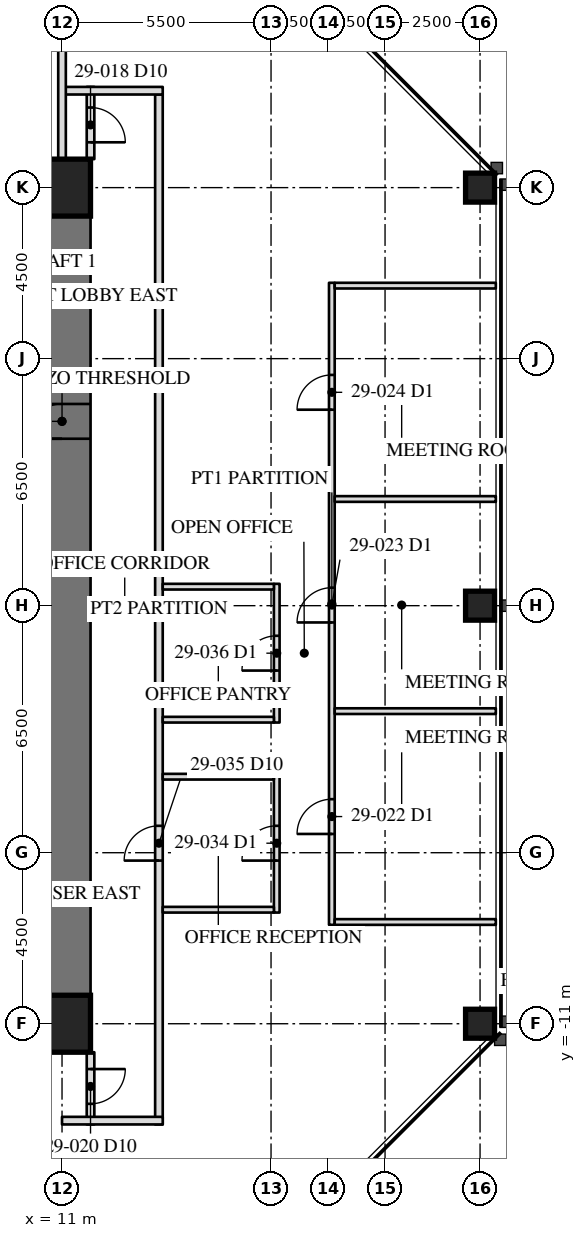
"""IFC4 building model, lengths in metres.
Left out: names, types, materials, properties, quantities, classifications, styles, units other than length and angle.
Written with IfcOpenShell. Run it as: python <this file> out.ifc"""

import sys

from ifc_helpers import new_model, si_unit, direction, frame, frame_2d, origin, origin_2d, place, context, subcontext, project, spatial, rectangle, hollow_rectangle, extrude, element, fill, save


model = new_model("IFC4")
c1 = context("Model", 3, precision=1e-05, world=origin(), true_north=direction((0.0, 1.0)))
c2 = subcontext(c1, "Body", "Model", "MODEL_VIEW")
j1 = project(units=[si_unit("LENGTHUNIT", "METRE"), si_unit("PLANEANGLEUNIT", "RADIAN")], contexts=[c1])
p1 = place(None, origin())
s1 = spatial("IfcSite", under=j1, at=p1, CompositionType="ELEMENT")
p2 = place(p1, origin())
s2 = spatial("IfcBuilding", under=s1, at=p2, CompositionType="ELEMENT")
p3 = place(p2, frame((0.0, 0.0, 125.4)))
s3 = spatial("IfcBuildingStorey", under=s2, at=p3, CompositionType="ELEMENT", Elevation=125.4)
for number, where, z_axis, x_axis in (
    (1, (22.0, -11.0, 0.0), (0.0, 0.0, 1.0), (0.0, 1.0, 0.0)),
    (2, (22.0, 0.0, 0.0), (0.0, 0.0, 1.0), (0.0, 1.0, 0.0)),
    (3, (22.0, 11.0, 0.0), (0.0, 0.0, 1.0), (0.0, 1.0, 0.0)),
):
    element("IfcColumn", number, at=place(p3, frame(where, z_axis=z_axis, x_axis=x_axis)), inside=s3, PredefinedType="COLUMN", context=c2, shape_type="SweptSolid", body=[
        extrude(hollow_rectangle(XDim=0.762, YDim=0.762, WallThickness=0.076, at=origin_2d()), origin(), (0.0, 0.0, 1.0), 4.1),
    ])
p4 = place(p3, frame((11.0, -11.0, 0.0), z_axis=(0.0, 0.0, 1.0), x_axis=(0.0, 1.0, 0.0)))
e4 = element("IfcWall", 4, at=p4, inside=s3, PredefinedType="SHEAR", context=c2, shape_type="SweptSolid", body=[
    extrude(rectangle(XDim=22.0, YDim=1.5, at=frame_2d((11.0, 0.0))), origin(), (0.0, 0.0, 1.0), 4.1),
])
p5 = place(p4, frame((15.393, 0.0, 0.0)))
e5 = element("IfcOpeningElement", 5, at=p5, cuts=e4, PredefinedType="OPENING", context=c2, shape_type="SweptSolid", body=[
    extrude(rectangle(XDim=0.915, YDim=2.134, at=frame_2d((0.458, 1.067))), frame((0.0, 0.76, 0.0), z_axis=(0.0, -1.0, 0.0), x_axis=(1.0, 0.0, 0.0)), (0.0, 0.0, 1.0), 1.52),
])
for number, where, z_axis, x_axis in (
    (6, (11.0, 11.0, 0.0), (0.0, 0.0, 1.0), (-1.0, 0.0, 0.0)),
    (7, (6.5, -11.0, 0.0), (0.0, 0.0, 1.0), (1.0, 0.0, 0.0)),
):
    element("IfcWall", number, at=place(p3, frame(where, z_axis=z_axis, x_axis=x_axis)), inside=s3, PredefinedType="SHEAR", context=c2, shape_type="SweptSolid", body=[
        extrude(rectangle(XDim=4.5, YDim=1.5, at=frame_2d((2.25, 0.0))), origin(), (0.0, 0.0, 1.0), 4.1),
    ])
for number, where, z_axis, x_axis in (
    (8, (11.0, 11.0, 0.0), (0.0, 0.0, 1.0), (1.0, 0.0, 0.0)),
    (9, (11.0, -11.0, 0.0), (0.0, 0.0, 1.0), (1.0, 0.0, 0.0)),
):
    element("IfcColumn", number, at=place(p3, frame(where, z_axis=z_axis, x_axis=x_axis)), inside=s3, PredefinedType="COLUMN", context=c2, shape_type="SweptSolid", body=[
        extrude(hollow_rectangle(XDim=1.499, YDim=1.499, WallThickness=0.102, at=origin_2d()), origin(), (0.0, 0.0, 1.0), 4.1),
    ])
p6 = place(p3, frame((13.55, -13.65, 0.0), z_axis=(0.0, 0.0, 1.0), x_axis=(0.0, 1.0, 0.0)))
e10 = element("IfcWall", 10, at=p6, inside=s3, PredefinedType="PARTITIONING", context=c2, shape_type="SweptSolid", body=[
    extrude(rectangle(XDim=27.1, YDim=0.2, at=frame_2d((13.55, 0.0))), origin(), (0.0, 0.0, 1.0), 3.91),
])
p7 = place(p6, frame((6.942, 0.0, 0.0)))
e11 = element("IfcOpeningElement", 11, at=p7, cuts=e10, PredefinedType="OPENING", context=c2, shape_type="SweptSolid", body=[
    extrude(rectangle(XDim=0.915, YDim=2.134, at=frame_2d((0.458, 1.067))), frame((0.0, 0.11, 0.0), z_axis=(0.0, -1.0, 0.0), x_axis=(1.0, 0.0, 0.0)), (0.0, 0.0, 1.0), 0.22),
])
p8 = place(p3, frame((11.75, 11.75, 0.0), z_axis=(0.0, 0.0, 1.0), x_axis=(0.0, 1.0, 0.0)))
e12 = element("IfcWall", 12, at=p8, inside=s3, PredefinedType="PARTITIONING", context=c2, shape_type="SweptSolid", body=[
    extrude(rectangle(XDim=1.9, YDim=0.2, at=frame_2d((0.95, 0.0))), origin(), (0.0, 0.0, 1.0), 3.91),
])
p9 = place(p8, frame((0.442, 0.0, 0.0)))
e13 = element("IfcOpeningElement", 13, at=p9, cuts=e12, PredefinedType="OPENING", context=c2, shape_type="SweptSolid", body=[
    extrude(rectangle(XDim=0.915, YDim=2.134, at=frame_2d((0.458, 1.067))), frame((0.0, 0.11, 0.0), z_axis=(0.0, -1.0, 0.0), x_axis=(1.0, 0.0, 0.0)), (0.0, 0.0, 1.0), 0.22),
])
p10 = place(p3, frame((11.0, 13.55, 0.0), z_axis=(0.0, 0.0, 1.0), x_axis=(1.0, 0.0, 0.0)))
e14 = element("IfcWall", 14, at=p10, inside=s3, PredefinedType="PARTITIONING", context=c2, shape_type="SweptSolid", body=[
    extrude(rectangle(XDim=2.65, YDim=0.2, at=frame_2d((1.325, 0.0))), origin(), (0.0, 0.0, 1.0), 3.91),
])
p11 = place(p3, frame((11.75, -11.75, 0.0), z_axis=(0.0, 0.0, 1.0), x_axis=(0.0, -1.0, 0.0)))
e15 = element("IfcWall", 15, at=p11, inside=s3, PredefinedType="PARTITIONING", context=c2, shape_type="SweptSolid", body=[
    extrude(rectangle(XDim=1.9, YDim=0.2, at=frame_2d((0.95, 0.0))), origin(), (0.0, 0.0, 1.0), 3.91),
])
p12 = place(p11, frame((0.442, 0.0, 0.0)))
e16 = element("IfcOpeningElement", 16, at=p12, cuts=e15, PredefinedType="OPENING", context=c2, shape_type="SweptSolid", body=[
    extrude(rectangle(XDim=0.915, YDim=2.134, at=frame_2d((0.458, 1.067))), frame((0.0, 0.11, 0.0), z_axis=(0.0, -1.0, 0.0), x_axis=(1.0, 0.0, 0.0)), (0.0, 0.0, 1.0), 0.22),
])
p13 = place(p3, frame((11.0, -13.55, 0.0), z_axis=(0.0, 0.0, 1.0), x_axis=(1.0, 0.0, 0.0)))
e17 = element("IfcWall", 17, at=p13, inside=s3, PredefinedType="PARTITIONING", context=c2, shape_type="SweptSolid", body=[
    extrude(rectangle(XDim=2.65, YDim=0.2, at=frame_2d((1.325, 0.0))), origin(), (0.0, 0.0, 1.0), 3.91),
])
p14 = place(p3, frame((11.0, 11.75, 0.0), z_axis=(0.0, 0.0, 1.0), x_axis=(0.0, 1.0, 0.0)))
e18 = element("IfcWall", 18, at=p14, inside=s3, PredefinedType="PARTITIONING", context=c2, shape_type="SweptSolid", body=[
    extrude(rectangle(XDim=10.665, YDim=0.2, at=frame_2d((5.333, 0.0))), origin(), (0.0, 0.0, 1.0), 3.326),
])
p15 = place(p3, frame((18.1, -8.398, 0.0), z_axis=(0.0, 0.0, 1.0), x_axis=(0.0, 1.0, 0.0)))
e19 = element("IfcWall", 19, at=p15, inside=s3, PredefinedType="PARTITIONING", context=c2, shape_type="SweptSolid", body=[
    extrude(rectangle(XDim=16.894, YDim=0.15, at=frame_2d((8.447, 0.0))), origin(), (0.0, 0.0, 1.0), 3.91),
])
p16 = place(p15, frame((2.392, 0.0, 0.0)))
e20 = element("IfcOpeningElement", 20, at=p16, cuts=e19, PredefinedType="OPENING", context=c2, shape_type="SweptSolid", body=[
    extrude(rectangle(XDim=0.915, YDim=2.134, at=frame_2d((0.458, 1.067))), frame((0.0, 0.085, 0.0), z_axis=(0.0, -1.0, 0.0), x_axis=(1.0, 0.0, 0.0)), (0.0, 0.0, 1.0), 0.17),
])
p17 = place(p15, frame((7.957, 0.0, 0.0)))
e21 = element("IfcOpeningElement", 21, at=p17, cuts=e19, PredefinedType="OPENING", context=c2, shape_type="SweptSolid", body=[
    extrude(rectangle(XDim=0.915, YDim=2.134, at=frame_2d((0.458, 1.067))), frame((0.0, 0.085, 0.0), z_axis=(0.0, -1.0, 0.0), x_axis=(1.0, 0.0, 0.0)), (0.0, 0.0, 1.0), 0.17),
])
p18 = place(p15, frame((13.554, 0.0, 0.0)))
e22 = element("IfcOpeningElement", 22, at=p18, cuts=e19, PredefinedType="OPENING", context=c2, shape_type="SweptSolid", body=[
    extrude(rectangle(XDim=0.915, YDim=2.134, at=frame_2d((0.458, 1.067))), frame((0.0, 0.085, 0.0), z_axis=(0.0, -1.0, 0.0), x_axis=(1.0, 0.0, 0.0)), (0.0, 0.0, 1.0), 0.17),
])
for number, where, z_axis, x_axis in (
    (23, (18.175, -8.323, 0.0), (0.0, 0.0, 1.0), (1.0, 0.0, 0.0)),
    (24, (18.175, -2.775, 0.0), (0.0, 0.0, 1.0), (1.0, 0.0, 0.0)),
    (25, (18.175, 2.807, 0.0), (0.0, 0.0, 1.0), (1.0, 0.0, 0.0)),
    (26, (18.175, 8.421, 0.0), (0.0, 0.0, 1.0), (1.0, 0.0, 0.0)),
):
    element("IfcWall", number, at=place(p3, frame(where, z_axis=z_axis, x_axis=x_axis)), inside=s3, PredefinedType="PARTITIONING", context=c2, shape_type="SweptSolid", body=[
        extrude(rectangle(XDim=4.24, YDim=0.15, at=frame_2d((2.12, 0.0))), origin(), (0.0, 0.0, 1.0), 3.91),
    ])
p19 = place(p3, frame((16.65, -8.075, 0.0), z_axis=(0.0, 0.0, 1.0), x_axis=(0.0, 1.0, 0.0)))
e27 = element("IfcWall", 27, at=p19, inside=s3, PredefinedType="PARTITIONING", context=c2, shape_type="SweptSolid", body=[
    extrude(rectangle(XDim=3.65, YDim=0.15, at=frame_2d((1.825, 0.0))), origin(), (0.0, 0.0, 1.0), 3.91),
])
p20 = place(p19, frame((1.367, 0.0, 0.0)))
e28 = element("IfcOpeningElement", 28, at=p20, cuts=e27, PredefinedType="OPENING", context=c2, shape_type="SweptSolid", body=[
    extrude(rectangle(XDim=0.915, YDim=2.134, at=frame_2d((0.458, 1.067))), frame((0.0, 0.085, 0.0), z_axis=(0.0, -1.0, 0.0), x_axis=(1.0, 0.0, 0.0)), (0.0, 0.0, 1.0), 0.17),
])
for number, where, z_axis, x_axis in (
    (29, (16.575, -8.0, 0.0), (0.0, 0.0, 1.0), (-1.0, 0.0, 0.0)),
    (30, (16.575, -4.5, 0.0), (0.0, 0.0, 1.0), (-1.0, 0.0, 0.0)),
):
    element("IfcWall", number, at=place(p3, frame(where, z_axis=z_axis, x_axis=x_axis)), inside=s3, PredefinedType="PARTITIONING", context=c2, shape_type="SweptSolid", body=[
        extrude(rectangle(XDim=2.925, YDim=0.15, at=frame_2d((1.462, 0.0))), origin(), (0.0, 0.0, 1.0), 3.91),
    ])
p21 = place(p3, frame((16.65, -3.075, 0.0), z_axis=(0.0, 0.0, 1.0), x_axis=(0.0, 1.0, 0.0)))
e31 = element("IfcWall", 31, at=p21, inside=s3, PredefinedType="PARTITIONING", context=c2, shape_type="SweptSolid", body=[
    extrude(rectangle(XDim=3.65, YDim=0.15, at=frame_2d((1.825, 0.0))), origin(), (0.0, 0.0, 1.0), 3.91),
])
p22 = place(p21, frame((1.367, 0.0, 0.0)))
e32 = element("IfcOpeningElement", 32, at=p22, cuts=e31, PredefinedType="OPENING", context=c2, shape_type="SweptSolid", body=[
    extrude(rectangle(XDim=0.915, YDim=2.134, at=frame_2d((0.458, 1.067))), frame((0.0, 0.085, 0.0), z_axis=(0.0, -1.0, 0.0), x_axis=(1.0, 0.0, 0.0)), (0.0, 0.0, 1.0), 0.17),
])
for number, where, z_axis, x_axis in (
    (33, (16.575, -3.0, 0.0), (0.0, 0.0, 1.0), (-1.0, 0.0, 0.0)),
    (34, (16.575, 0.5, 0.0), (0.0, 0.0, 1.0), (-1.0, 0.0, 0.0)),
):
    element("IfcWall", number, at=place(p3, frame(where, z_axis=z_axis, x_axis=x_axis)), inside=s3, PredefinedType="PARTITIONING", context=c2, shape_type="SweptSolid", body=[
        extrude(rectangle(XDim=2.925, YDim=0.15, at=frame_2d((1.462, 0.0))), origin(), (0.0, 0.0, 1.0), 3.91),
    ])
p23 = place(p5, origin())
e35 = element("IfcDoor", 35, at=p23, inside=s3, OperationType="SINGLE_SWING_RIGHT", PredefinedType="DOOR", context=c2, shape_type="SweptSolid", body=[
    extrude(rectangle(XDim=0.915, YDim=2.134, at=frame_2d((0.458, 1.067))), frame((0.0, -0.675, 0.0), z_axis=(0.0, -1.0, 0.0), x_axis=(1.0, 0.0, 0.0)), (0.0, 0.0, 1.0), 0.05),
])
fill(e5, e35)
p24 = place(p9, frame((0.915, 0.0, 0.0), z_axis=(0.0, 0.0, 1.0), x_axis=(-1.0, 0.0, 0.0)))
e36 = element("IfcDoor", 36, at=p24, inside=s3, OperationType="SINGLE_SWING_LEFT", PredefinedType="DOOR", context=c2, shape_type="SweptSolid", body=[
    extrude(rectangle(XDim=0.915, YDim=2.134, at=frame_2d((0.458, 1.067))), frame((0.0, 0.025, 0.0), z_axis=(0.0, -1.0, 0.0), x_axis=(1.0, 0.0, 0.0)), (0.0, 0.0, 1.0), 0.05),
])
fill(e13, e36)
p25 = place(p12, origin())
e37 = element("IfcDoor", 37, at=p25, inside=s3, OperationType="SINGLE_SWING_LEFT", PredefinedType="DOOR", context=c2, shape_type="SweptSolid", body=[
    extrude(rectangle(XDim=0.915, YDim=2.134, at=frame_2d((0.458, 1.067))), frame((0.0, 0.025, 0.0), z_axis=(0.0, -1.0, 0.0), x_axis=(1.0, 0.0, 0.0)), (0.0, 0.0, 1.0), 0.05),
])
fill(e16, e37)
p26 = place(p16, origin())
e38 = element("IfcDoor", 38, at=p26, inside=s3, OperationType="SINGLE_SWING_LEFT", PredefinedType="DOOR", context=c2, shape_type="SweptSolid", body=[
    extrude(rectangle(XDim=0.915, YDim=2.134, at=frame_2d((0.458, 1.067))), frame((0.0, 0.025, 0.0), z_axis=(0.0, -1.0, 0.0), x_axis=(1.0, 0.0, 0.0)), (0.0, 0.0, 1.0), 0.05),
])
fill(e20, e38)
p27 = place(p17, origin())
e39 = element("IfcDoor", 39, at=p27, inside=s3, OperationType="SINGLE_SWING_LEFT", PredefinedType="DOOR", context=c2, shape_type="SweptSolid", body=[
    extrude(rectangle(XDim=0.915, YDim=2.134, at=frame_2d((0.458, 1.067))), frame((0.0, 0.025, 0.0), z_axis=(0.0, -1.0, 0.0), x_axis=(1.0, 0.0, 0.0)), (0.0, 0.0, 1.0), 0.05),
])
fill(e21, e39)
p28 = place(p18, origin())
e40 = element("IfcDoor", 40, at=p28, inside=s3, OperationType="SINGLE_SWING_LEFT", PredefinedType="DOOR", context=c2, shape_type="SweptSolid", body=[
    extrude(rectangle(XDim=0.915, YDim=2.134, at=frame_2d((0.458, 1.067))), frame((0.0, 0.025, 0.0), z_axis=(0.0, -1.0, 0.0), x_axis=(1.0, 0.0, 0.0)), (0.0, 0.0, 1.0), 0.05),
])
fill(e22, e40)
p29 = place(p20, origin())
e41 = element("IfcDoor", 41, at=p29, inside=s3, OperationType="SINGLE_SWING_LEFT", PredefinedType="DOOR", context=c2, shape_type="SweptSolid", body=[
    extrude(rectangle(XDim=0.915, YDim=2.134, at=frame_2d((0.458, 1.067))), frame((0.0, 0.025, 0.0), z_axis=(0.0, -1.0, 0.0), x_axis=(1.0, 0.0, 0.0)), (0.0, 0.0, 1.0), 0.05),
])
fill(e28, e41)
p30 = place(p7, origin())
e42 = element("IfcDoor", 42, at=p30, inside=s3, OperationType="SINGLE_SWING_LEFT", PredefinedType="DOOR", context=c2, shape_type="SweptSolid", body=[
    extrude(rectangle(XDim=0.915, YDim=2.134, at=frame_2d((0.458, 1.067))), frame((0.0, 0.025, 0.0), z_axis=(0.0, -1.0, 0.0), x_axis=(1.0, 0.0, 0.0)), (0.0, 0.0, 1.0), 0.05),
])
fill(e11, e42)
p31 = place(p22, origin())
e43 = element("IfcDoor", 43, at=p31, inside=s3, OperationType="SINGLE_SWING_LEFT", PredefinedType="DOOR", context=c2, shape_type="SweptSolid", body=[
    extrude(rectangle(XDim=0.915, YDim=2.134, at=frame_2d((0.458, 1.067))), frame((0.0, 0.025, 0.0), z_axis=(0.0, -1.0, 0.0), x_axis=(1.0, 0.0, 0.0)), (0.0, 0.0, 1.0), 0.05),
])
fill(e32, e43)
save(model, sys.argv[1])
